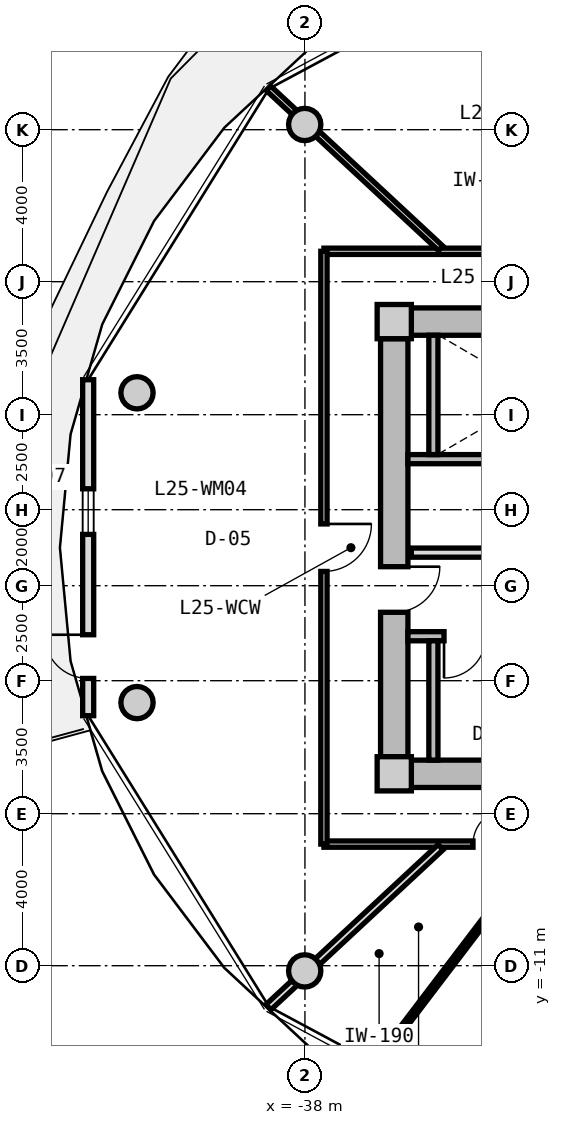
"""IFC4 building model, lengths in metres.
Left out: names, types, materials, properties, quantities, classifications, styles, units other than length and angle.
Written with IfcOpenShell. Run it as: python <this file> out.ifc"""

import sys

from ifc_helpers import new_model, si_unit, direction, frame, frame_2d, origin, origin_2d, place, context, subcontext, project, spatial, rectangle, circle, extrude, source, transform, mapped, element, fill, save


model = new_model("IFC4")
c1 = context("Model", 3, precision=1e-05, world=origin(), true_north=direction((0.0, 1.0)))
c2 = subcontext(c1, "Body", "Model", "MODEL_VIEW")
j1 = project(units=[si_unit("LENGTHUNIT", "METRE"), si_unit("PLANEANGLEUNIT", "RADIAN")], contexts=[c1])
p1 = place(None, origin())
s1 = spatial("IfcSite", under=j1, at=p1, CompositionType="ELEMENT")
p2 = place(p1, origin())
s2 = spatial("IfcBuilding", under=s1, at=p2, CompositionType="ELEMENT")
p3 = place(p2, frame((0.0, 0.0, 84.05)))
s3 = spatial("IfcBuildingStorey", under=s2, at=p3, CompositionType="ELEMENT", Elevation=84.05)
m1 = source(origin(), c2, "Body", "SweptSolid", [
    extrude(rectangle(XDim=0.9, YDim=0.9, at=origin_2d()), origin(), (0.0, 0.0, 1.0), 3.05),
])
for number, where, z_axis, x_axis in (
    (1, (-35.65, -5.95, 0.0), (0.0, 0.0, 1.0), (1.0, 0.0, 0.0)),
    (2, (-35.65, 5.95, 0.0), (0.0, 0.0, 1.0), (1.0, 0.0, 0.0)),
):
    element("IfcColumn", number, at=place(p3, frame(where, z_axis=z_axis, x_axis=x_axis)), inside=s3, PredefinedType="COLUMN", context=c2, shape_type="MappedRepresentation", body=[
        mapped(m1, transform((0.0, 0.0, 0.0), x_axis=(1.0, 0.0, 0.0), y_axis=(0.0, 1.0, 0.0), z_axis=(0.0, 0.0, 1.0), scale=1.0)),
    ])
m2 = source(origin(), c2, "Body", "SweptSolid", [
    extrude(rectangle(XDim=14.4, YDim=0.72, at=frame_2d((7.2, 0.0))), origin(), (0.0, 0.0, 1.0), 2.79),
])
for number, where, z_axis, x_axis in (
    (3, (-35.2, 5.95, 0.0), (0.0, 0.0, 1.0), (1.0, 0.0, 0.0)),
    (4, (-20.8, -5.95, 0.0), (0.0, 0.0, 1.0), (-1.0, 0.0, 0.0)),
):
    element("IfcWall", number, at=place(p3, frame(where, z_axis=z_axis, x_axis=x_axis)), inside=s3, PredefinedType="SHEAR", context=c2, shape_type="MappedRepresentation", body=[
        mapped(m2, transform((0.0, 0.0, 0.0), x_axis=(1.0, 0.0, 0.0), y_axis=(0.0, 1.0, 0.0), z_axis=(0.0, 0.0, 1.0), scale=1.0)),
    ])
m3 = source(origin(), c2, "Body", "SweptSolid", [
    extrude(rectangle(XDim=11.0, YDim=0.72, at=frame_2d((5.5, 0.0))), origin(), (0.0, 0.0, 1.0), 2.79),
])
p4 = place(p3, frame((-35.65, -5.5, 0.0), z_axis=(0.0, 0.0, 1.0), x_axis=(0.0, 1.0, 0.0)))
e5 = element("IfcWall", 5, at=p4, inside=s3, PredefinedType="SHEAR", context=c2, shape_type="MappedRepresentation", body=[
    mapped(m3, transform((0.0, 0.0, 0.0), x_axis=(1.0, 0.0, 0.0), y_axis=(0.0, 1.0, 0.0), z_axis=(0.0, 0.0, 1.0), scale=1.0)),
])
p5 = place(p4, frame((3.8, 0.0, 0.0)))
e6 = element("IfcOpeningElement", 6, at=p5, cuts=e5, PredefinedType="OPENING", context=c2, shape_type="SweptSolid", body=[
    extrude(rectangle(XDim=1.2, YDim=2.15, at=frame_2d((0.6, 1.075))), frame((0.0, 0.37, 0.0), z_axis=(0.0, -1.0, 0.0), x_axis=(1.0, 0.0, 0.0)), (0.0, 0.0, 1.0), 0.74),
])
m4 = source(origin(), c2, "Body", "SweptSolid", [
    extrude(circle(Radius=0.425, at=origin_2d()), origin(), (0.0, 0.0, 1.0), 3.05),
])
for number, where, z_axis, x_axis in (
    (7, (-38.006, 11.137, 0.0), (0.0, 0.0, 1.0), (1.0, 0.0, 0.0)),
    (8, (-42.419, 4.076, 0.0), (0.0, 0.0, 1.0), (1.0, 0.0, 0.0)),
    (9, (-42.419, -4.076, 0.0), (0.0, 0.0, 1.0), (1.0, 0.0, 0.0)),
    (10, (-38.006, -11.137, 0.0), (0.0, 0.0, 1.0), (1.0, 0.0, 0.0)),
):
    element("IfcColumn", number, at=place(p3, frame(where, z_axis=z_axis, x_axis=x_axis)), inside=s3, PredefinedType="COLUMN", context=c2, shape_type="MappedRepresentation", body=[
        mapped(m4, transform((0.0, 0.0, 0.0), x_axis=(1.0, 0.0, 0.0), y_axis=(0.0, 1.0, 0.0), z_axis=(0.0, 0.0, 1.0), scale=1.0)),
    ])
m5 = source(origin(), c2, "Body", "SweptSolid", [
    extrude(rectangle(XDim=8.841, YDim=0.29, at=frame_2d((4.421, 0.0))), origin(), (0.0, 0.0, 1.0), 2.79),
])
p6 = place(p3, frame((-43.704, -4.421, 0.0), z_axis=(0.0, 0.0, 1.0), x_axis=(0.0, 1.0, 0.0)))
e11 = element("IfcWall", 11, at=p6, inside=s3, PredefinedType="SOLIDWALL", context=c2, shape_type="MappedRepresentation", body=[
    mapped(m5, transform((0.0, 0.0, 0.0), x_axis=(1.0, 0.0, 0.0), y_axis=(0.0, 1.0, 0.0), z_axis=(0.0, 0.0, 1.0), scale=1.0)),
])
p7 = place(p6, frame((0.98, 0.0, 0.0)))
e12 = element("IfcOpeningElement", 12, at=p7, cuts=e11, PredefinedType="OPENING", context=c2, shape_type="SweptSolid", body=[
    extrude(rectangle(XDim=1.15, YDim=2.25, at=frame_2d((0.575, 1.125))), frame((0.0, 0.155, 0.0), z_axis=(0.0, -1.0, 0.0), x_axis=(1.0, 0.0, 0.0)), (0.0, 0.0, 1.0), 0.31),
])
p8 = place(p6, frame((4.771, 0.0, 0.85)))
e13 = element("IfcOpeningElement", 13, at=p8, cuts=e11, PredefinedType="OPENING", context=c2, shape_type="SweptSolid", body=[
    extrude(rectangle(XDim=1.2, YDim=1.5, at=frame_2d((0.6, 0.75))), frame((0.0, 0.155, 0.0), z_axis=(0.0, -1.0, 0.0), x_axis=(1.0, 0.0, 0.0)), (0.0, 0.0, 1.0), 0.31),
])
m6 = source(origin(), c2, "Body", "SweptSolid", [
    extrude(rectangle(XDim=7.83, YDim=0.24, at=frame_2d((3.915, 0.0))), origin(), (0.0, 0.0, 1.0), 2.79),
])
p9 = place(p3, frame((-35.29, 2.33, 0.0), z_axis=(0.0, 0.0, 1.0), x_axis=(1.0, 0.0, 0.0)))
e14 = element("IfcWall", 14, at=p9, inside=s3, PredefinedType="PARTITIONING", context=c2, shape_type="MappedRepresentation", body=[
    mapped(m6, transform((0.0, 0.0, 0.0), x_axis=(1.0, 0.0, 0.0), y_axis=(0.0, 1.0, 0.0), z_axis=(0.0, 0.0, 1.0), scale=1.0)),
])
m7 = source(origin(), c2, "Body", "SweptSolid", [
    extrude(rectangle(XDim=3.14, YDim=0.24, at=frame_2d((1.57, 0.0))), origin(), (0.0, 0.0, 1.0), 2.79),
])
p10 = place(p3, frame((-34.62, 2.45, 0.0), z_axis=(0.0, 0.0, 1.0), x_axis=(0.0, 1.0, 0.0)))
e15 = element("IfcWall", 15, at=p10, inside=s3, PredefinedType="PARTITIONING", context=c2, shape_type="MappedRepresentation", body=[
    mapped(m7, transform((0.0, 0.0, 0.0), x_axis=(1.0, 0.0, 0.0), y_axis=(0.0, 1.0, 0.0), z_axis=(0.0, 0.0, 1.0), scale=1.0)),
])
p11 = place(p3, frame((-35.29, -2.33, 0.0), z_axis=(0.0, 0.0, 1.0), x_axis=(1.0, 0.0, 0.0)))
e16 = element("IfcWall", 16, at=p11, inside=s3, PredefinedType="PARTITIONING", context=c2, shape_type="MappedRepresentation", body=[
    mapped(m6, transform((0.0, 0.0, 0.0), x_axis=(1.0, 0.0, 0.0), y_axis=(0.0, 1.0, 0.0), z_axis=(0.0, 0.0, 1.0), scale=1.0)),
])
p12 = place(p11, frame((0.95, 0.0, 0.0)))
e17 = element("IfcOpeningElement", 17, at=p12, cuts=e16, PredefinedType="OPENING", context=c2, shape_type="SweptSolid", body=[
    extrude(rectangle(XDim=1.1, YDim=2.15, at=frame_2d((0.55, 1.075))), frame((0.0, 0.13, 0.0), z_axis=(0.0, -1.0, 0.0), x_axis=(1.0, 0.0, 0.0)), (0.0, 0.0, 1.0), 0.26),
])
p13 = place(p3, frame((-34.62, -5.59, 0.0), z_axis=(0.0, 0.0, 1.0), x_axis=(0.0, 1.0, 0.0)))
e18 = element("IfcWall", 18, at=p13, inside=s3, PredefinedType="PARTITIONING", context=c2, shape_type="MappedRepresentation", body=[
    mapped(m7, transform((0.0, 0.0, 0.0), x_axis=(1.0, 0.0, 0.0), y_axis=(0.0, 1.0, 0.0), z_axis=(0.0, 0.0, 1.0), scale=1.0)),
])
m8 = source(origin(), c2, "Body", "SweptSolid", [
    extrude(rectangle(XDim=7.62, YDim=0.24, at=frame_2d((3.81, 0.0))), origin(), (0.0, 0.0, 1.0), 2.775),
])
p14 = place(p3, frame((-35.2, -0.13, 0.0), z_axis=(0.0, 0.0, 1.0), x_axis=(1.0, 0.0, 0.0)))
e19 = element("IfcWall", 19, at=p14, inside=s3, PredefinedType="PARTITIONING", context=c2, shape_type="MappedRepresentation", body=[
    mapped(m8, transform((0.0, 0.0, 0.0), x_axis=(1.0, 0.0, 0.0), y_axis=(0.0, 1.0, 0.0), z_axis=(0.0, 0.0, 1.0), scale=1.0)),
])
p15 = place(p14, frame((6.22, 0.0, 0.0)))
e20 = element("IfcOpeningElement", 20, at=p15, cuts=e19, PredefinedType="OPENING", context=c2, shape_type="SweptSolid", body=[
    extrude(rectangle(XDim=1.0, YDim=2.1, at=frame_2d((0.5, 1.05))), frame((0.0, 0.13, 0.0), z_axis=(0.0, -1.0, 0.0), x_axis=(1.0, 0.0, 0.0)), (0.0, 0.0, 1.0), 0.26),
])
p16 = place(p14, frame((2.4, 0.0, 0.0)))
e21 = element("IfcOpeningElement", 21, at=p16, cuts=e19, PredefinedType="OPENING", context=c2, shape_type="SweptSolid", body=[
    extrude(rectangle(XDim=1.0, YDim=2.1, at=frame_2d((0.5, 1.05))), frame((0.0, 0.13, 0.0), z_axis=(0.0, -1.0, 0.0), x_axis=(1.0, 0.0, 0.0)), (0.0, 0.0, 1.0), 0.26),
])
m9 = source(origin(), c2, "Body", "SweptSolid", [
    extrude(rectangle(XDim=8.6, YDim=0.165, at=frame_2d((4.3, 0.0))), origin(), (0.0, 0.0, 1.0), 2.775),
])
p17 = place(p3, frame((-37.5, 7.8, 0.0), z_axis=(0.0, 0.0, 1.0), x_axis=(1.0, 0.0, 0.0)))
e22 = element("IfcWall", 22, at=p17, inside=s3, PredefinedType="PARTITIONING", context=c2, shape_type="MappedRepresentation", body=[
    mapped(m9, transform((0.0, 0.0, 0.0), x_axis=(1.0, 0.0, 0.0), y_axis=(0.0, 1.0, 0.0), z_axis=(0.0, 0.0, 1.0), scale=1.0)),
])
m10 = source(origin(), c2, "Body", "SweptSolid", [
    extrude(rectangle(XDim=9.234, YDim=0.165, at=frame_2d((4.617, 0.0))), origin(), (0.0, 0.0, 1.0), 2.775),
])
p18 = place(p3, frame((-28.266, -7.8, 0.0), z_axis=(0.0, 0.0, 1.0), x_axis=(-1.0, 0.0, 0.0)))
e23 = element("IfcWall", 23, at=p18, inside=s3, PredefinedType="PARTITIONING", context=c2, shape_type="MappedRepresentation", body=[
    mapped(m10, transform((0.0, 0.0, 0.0), x_axis=(1.0, 0.0, 0.0), y_axis=(0.0, 1.0, 0.0), z_axis=(0.0, 0.0, 1.0), scale=1.0)),
])
p19 = place(p18, frame((4.392, 0.0, 0.0)))
e24 = element("IfcOpeningElement", 24, at=p19, cuts=e23, PredefinedType="OPENING", context=c2, shape_type="SweptSolid", body=[
    extrude(rectangle(XDim=0.92, YDim=2.1, at=frame_2d((0.46, 1.05))), frame((0.0, 0.093, 0.0), z_axis=(0.0, -1.0, 0.0), x_axis=(1.0, 0.0, 0.0)), (0.0, 0.0, 1.0), 0.185),
])
p20 = place(p18, frame((1.408, 0.0, 0.0)))
e25 = element("IfcOpeningElement", 25, at=p20, cuts=e23, PredefinedType="OPENING", context=c2, shape_type="SweptSolid", body=[
    extrude(rectangle(XDim=0.92, YDim=2.1, at=frame_2d((0.46, 1.05))), frame((0.0, 0.093, 0.0), z_axis=(0.0, -1.0, 0.0), x_axis=(1.0, 0.0, 0.0)), (0.0, 0.0, 1.0), 0.185),
])
m11 = source(origin(), c2, "Body", "SweptSolid", [
    extrude(rectangle(XDim=15.6, YDim=0.165, at=frame_2d((7.8, 0.0))), origin(), (0.0, 0.0, 1.0), 2.775),
])
p21 = place(p3, frame((-37.5, -7.8, 0.0), z_axis=(0.0, 0.0, 1.0), x_axis=(0.0, 1.0, 0.0)))
e26 = element("IfcWall", 26, at=p21, inside=s3, PredefinedType="PARTITIONING", context=c2, shape_type="MappedRepresentation", body=[
    mapped(m11, transform((0.0, 0.0, 0.0), x_axis=(1.0, 0.0, 0.0), y_axis=(0.0, 1.0, 0.0), z_axis=(0.0, 0.0, 1.0), scale=1.0)),
])
p22 = place(p21, frame((7.175, 0.0, 0.0)))
e27 = element("IfcOpeningElement", 27, at=p22, cuts=e26, PredefinedType="OPENING", context=c2, shape_type="SweptSolid", body=[
    extrude(rectangle(XDim=1.25, YDim=2.2, at=frame_2d((0.625, 1.1))), frame((0.0, 0.093, 0.0), z_axis=(0.0, -1.0, 0.0), x_axis=(1.0, 0.0, 0.0)), (0.0, 0.0, 1.0), 0.185),
])
m12 = source(origin(), c2, "Body", "SweptSolid", [
    extrude(rectangle(XDim=6.187, YDim=0.165, at=frame_2d((3.093, 0.0))), origin(), (0.0, 0.0, 1.0), 2.275),
])
p23 = place(p3, frame((-34.429, 7.88, 0.0), z_axis=(0.0, 0.0, 1.0), x_axis=(-0.732501077882, 0.680765870841, 0.0)))
e28 = element("IfcWall", 28, at=p23, inside=s3, PredefinedType="PARTITIONING", context=c2, shape_type="MappedRepresentation", body=[
    mapped(m12, transform((0.0, 0.0, 0.0), x_axis=(1.0, 0.0, 0.0), y_axis=(0.0, 1.0, 0.0), z_axis=(0.0, 0.0, 1.0), scale=1.0)),
])
m13 = source(origin(), c2, "Body", "SweptSolid", [
    extrude(rectangle(XDim=6.187, YDim=0.19, at=frame_2d((3.093, 0.0))), origin(), (0.0, 0.0, 1.0), 2.275),
])
p24 = place(p3, frame((-34.429, -7.88, 0.0), z_axis=(0.0, 0.0, 1.0), x_axis=(-0.732501077882, -0.680765870841, 0.0)))
e29 = element("IfcWall", 29, at=p24, inside=s3, PredefinedType="PARTITIONING", context=c2, shape_type="MappedRepresentation", body=[
    mapped(m13, transform((0.0, 0.0, 0.0), x_axis=(1.0, 0.0, 0.0), y_axis=(0.0, 1.0, 0.0), z_axis=(0.0, 0.0, 1.0), scale=1.0)),
])
m14 = source(origin(), c2, "Body", "SweptSolid", [
    extrude(rectangle(XDim=7.243, YDim=0.14, at=frame_2d((3.621, 0.0))), origin(), (0.0, 0.0, 1.0), 2.775),
])
p25 = place(p3, frame((-31.774, -7.83, 0.0), z_axis=(0.0, 0.0, 1.0), x_axis=(-0.605111472002, -0.796140757939, 0.0)))
e30 = element("IfcWall", 30, at=p25, inside=s3, PredefinedType="PARTITIONING", context=c2, shape_type="MappedRepresentation", body=[
    mapped(m14, transform((0.0, 0.0, 0.0), x_axis=(1.0, 0.0, 0.0), y_axis=(0.0, 1.0, 0.0), z_axis=(0.0, 0.0, 1.0), scale=1.0)),
])
m15 = source(origin(), c2, "Body", "SweptSolid", [
    extrude(rectangle(XDim=1.15, YDim=2.25, at=frame_2d((0.575, 1.125))), frame((0.0, 0.025, 0.0), z_axis=(0.0, -1.0, 0.0), x_axis=(1.0, 0.0, 0.0)), (0.0, 0.0, 1.0), 0.05),
])
p26 = place(p7, origin())
e31 = element("IfcDoor", 31, at=p26, inside=s3, OperationType="SINGLE_SWING_RIGHT", PredefinedType="DOOR", context=c2, shape_type="MappedRepresentation", body=[
    mapped(m15, transform((0.0, 0.0, 0.0), x_axis=(1.0, 0.0, 0.0), y_axis=(0.0, 1.0, 0.0), z_axis=(0.0, 0.0, 1.0), scale=1.0)),
])
fill(e12, e31)
m16 = source(origin(), c2, "Body", "SweptSolid", [
    extrude(rectangle(XDim=1.2, YDim=1.5, at=frame_2d((0.6, 0.75))), frame((0.0, 0.03, 0.0), z_axis=(0.0, -1.0, 0.0), x_axis=(1.0, 0.0, 0.0)), (0.0, 0.0, 1.0), 0.06),
])
p27 = place(p8, origin())
e32 = element("IfcWindow", 32, at=p27, inside=s3, PartitioningType="SINGLE_PANEL", PredefinedType="WINDOW", context=c2, shape_type="MappedRepresentation", body=[
    mapped(m16, transform((0.0, 0.0, 0.0), x_axis=(1.0, 0.0, 0.0), y_axis=(0.0, 1.0, 0.0), z_axis=(0.0, 0.0, 1.0), scale=1.0)),
])
fill(e13, e32)
m17 = source(origin(), c2, "Body", "SweptSolid", [
    extrude(rectangle(XDim=1.1, YDim=2.15, at=frame_2d((0.55, 1.075))), frame((0.0, 0.025, 0.0), z_axis=(0.0, -1.0, 0.0), x_axis=(1.0, 0.0, 0.0)), (0.0, 0.0, 1.0), 0.05),
])
p28 = place(p12, frame((1.1, 0.0, 0.0), z_axis=(0.0, 0.0, 1.0), x_axis=(-1.0, 0.0, 0.0)))
e33 = element("IfcDoor", 33, at=p28, inside=s3, OperationType="SINGLE_SWING_RIGHT", PredefinedType="DOOR", context=c2, shape_type="MappedRepresentation", body=[
    mapped(m17, transform((0.0, 0.0, 0.0), x_axis=(1.0, 0.0, 0.0), y_axis=(0.0, 1.0, 0.0), z_axis=(0.0, 0.0, 1.0), scale=1.0)),
])
fill(e17, e33)
m18 = source(origin(), c2, "Body", "SweptSolid", [
    extrude(rectangle(XDim=1.2, YDim=2.15, at=frame_2d((0.6, 1.075))), frame((0.0, 0.025, 0.0), z_axis=(0.0, -1.0, 0.0), x_axis=(1.0, 0.0, 0.0)), (0.0, 0.0, 1.0), 0.05),
])
p29 = place(p5, frame((1.2, 0.0, 0.0), z_axis=(0.0, 0.0, 1.0), x_axis=(-1.0, 0.0, 0.0)))
e34 = element("IfcDoor", 34, at=p29, inside=s3, OperationType="SINGLE_SWING_LEFT", PredefinedType="DOOR", context=c2, shape_type="MappedRepresentation", body=[
    mapped(m18, transform((0.0, 0.0, 0.0), x_axis=(1.0, 0.0, 0.0), y_axis=(0.0, 1.0, 0.0), z_axis=(0.0, 0.0, 1.0), scale=1.0)),
])
fill(e6, e34)
m19 = source(origin(), c2, "Body", "SweptSolid", [
    extrude(rectangle(XDim=1.25, YDim=2.2, at=frame_2d((0.625, 1.1))), frame((0.0, 0.025, 0.0), z_axis=(0.0, -1.0, 0.0), x_axis=(1.0, 0.0, 0.0)), (0.0, 0.0, 1.0), 0.05),
])
p30 = place(p22, frame((1.25, 0.0, 0.0), z_axis=(0.0, 0.0, 1.0), x_axis=(-1.0, 0.0, 0.0)))
e35 = element("IfcDoor", 35, at=p30, inside=s3, OperationType="SINGLE_SWING_LEFT", PredefinedType="DOOR", context=c2, shape_type="MappedRepresentation", body=[
    mapped(m19, transform((0.0, 0.0, 0.0), x_axis=(1.0, 0.0, 0.0), y_axis=(0.0, 1.0, 0.0), z_axis=(0.0, 0.0, 1.0), scale=1.0)),
])
fill(e27, e35)
m20 = source(origin(), c2, "Body", "SweptSolid", [
    extrude(rectangle(XDim=0.92, YDim=2.1, at=frame_2d((0.46, 1.05))), frame((0.0, 0.025, 0.0), z_axis=(0.0, -1.0, 0.0), x_axis=(1.0, 0.0, 0.0)), (0.0, 0.0, 1.0), 0.05),
])
p31 = place(p19, frame((0.92, 0.0, 0.0), z_axis=(0.0, 0.0, 1.0), x_axis=(-1.0, 0.0, 0.0)))
e36 = element("IfcDoor", 36, at=p31, inside=s3, OperationType="SINGLE_SWING_RIGHT", PredefinedType="DOOR", context=c2, shape_type="MappedRepresentation", body=[
    mapped(m20, transform((0.0, 0.0, 0.0), x_axis=(1.0, 0.0, 0.0), y_axis=(0.0, 1.0, 0.0), z_axis=(0.0, 0.0, 1.0), scale=1.0)),
])
fill(e24, e36)
save(model, sys.argv[1])
